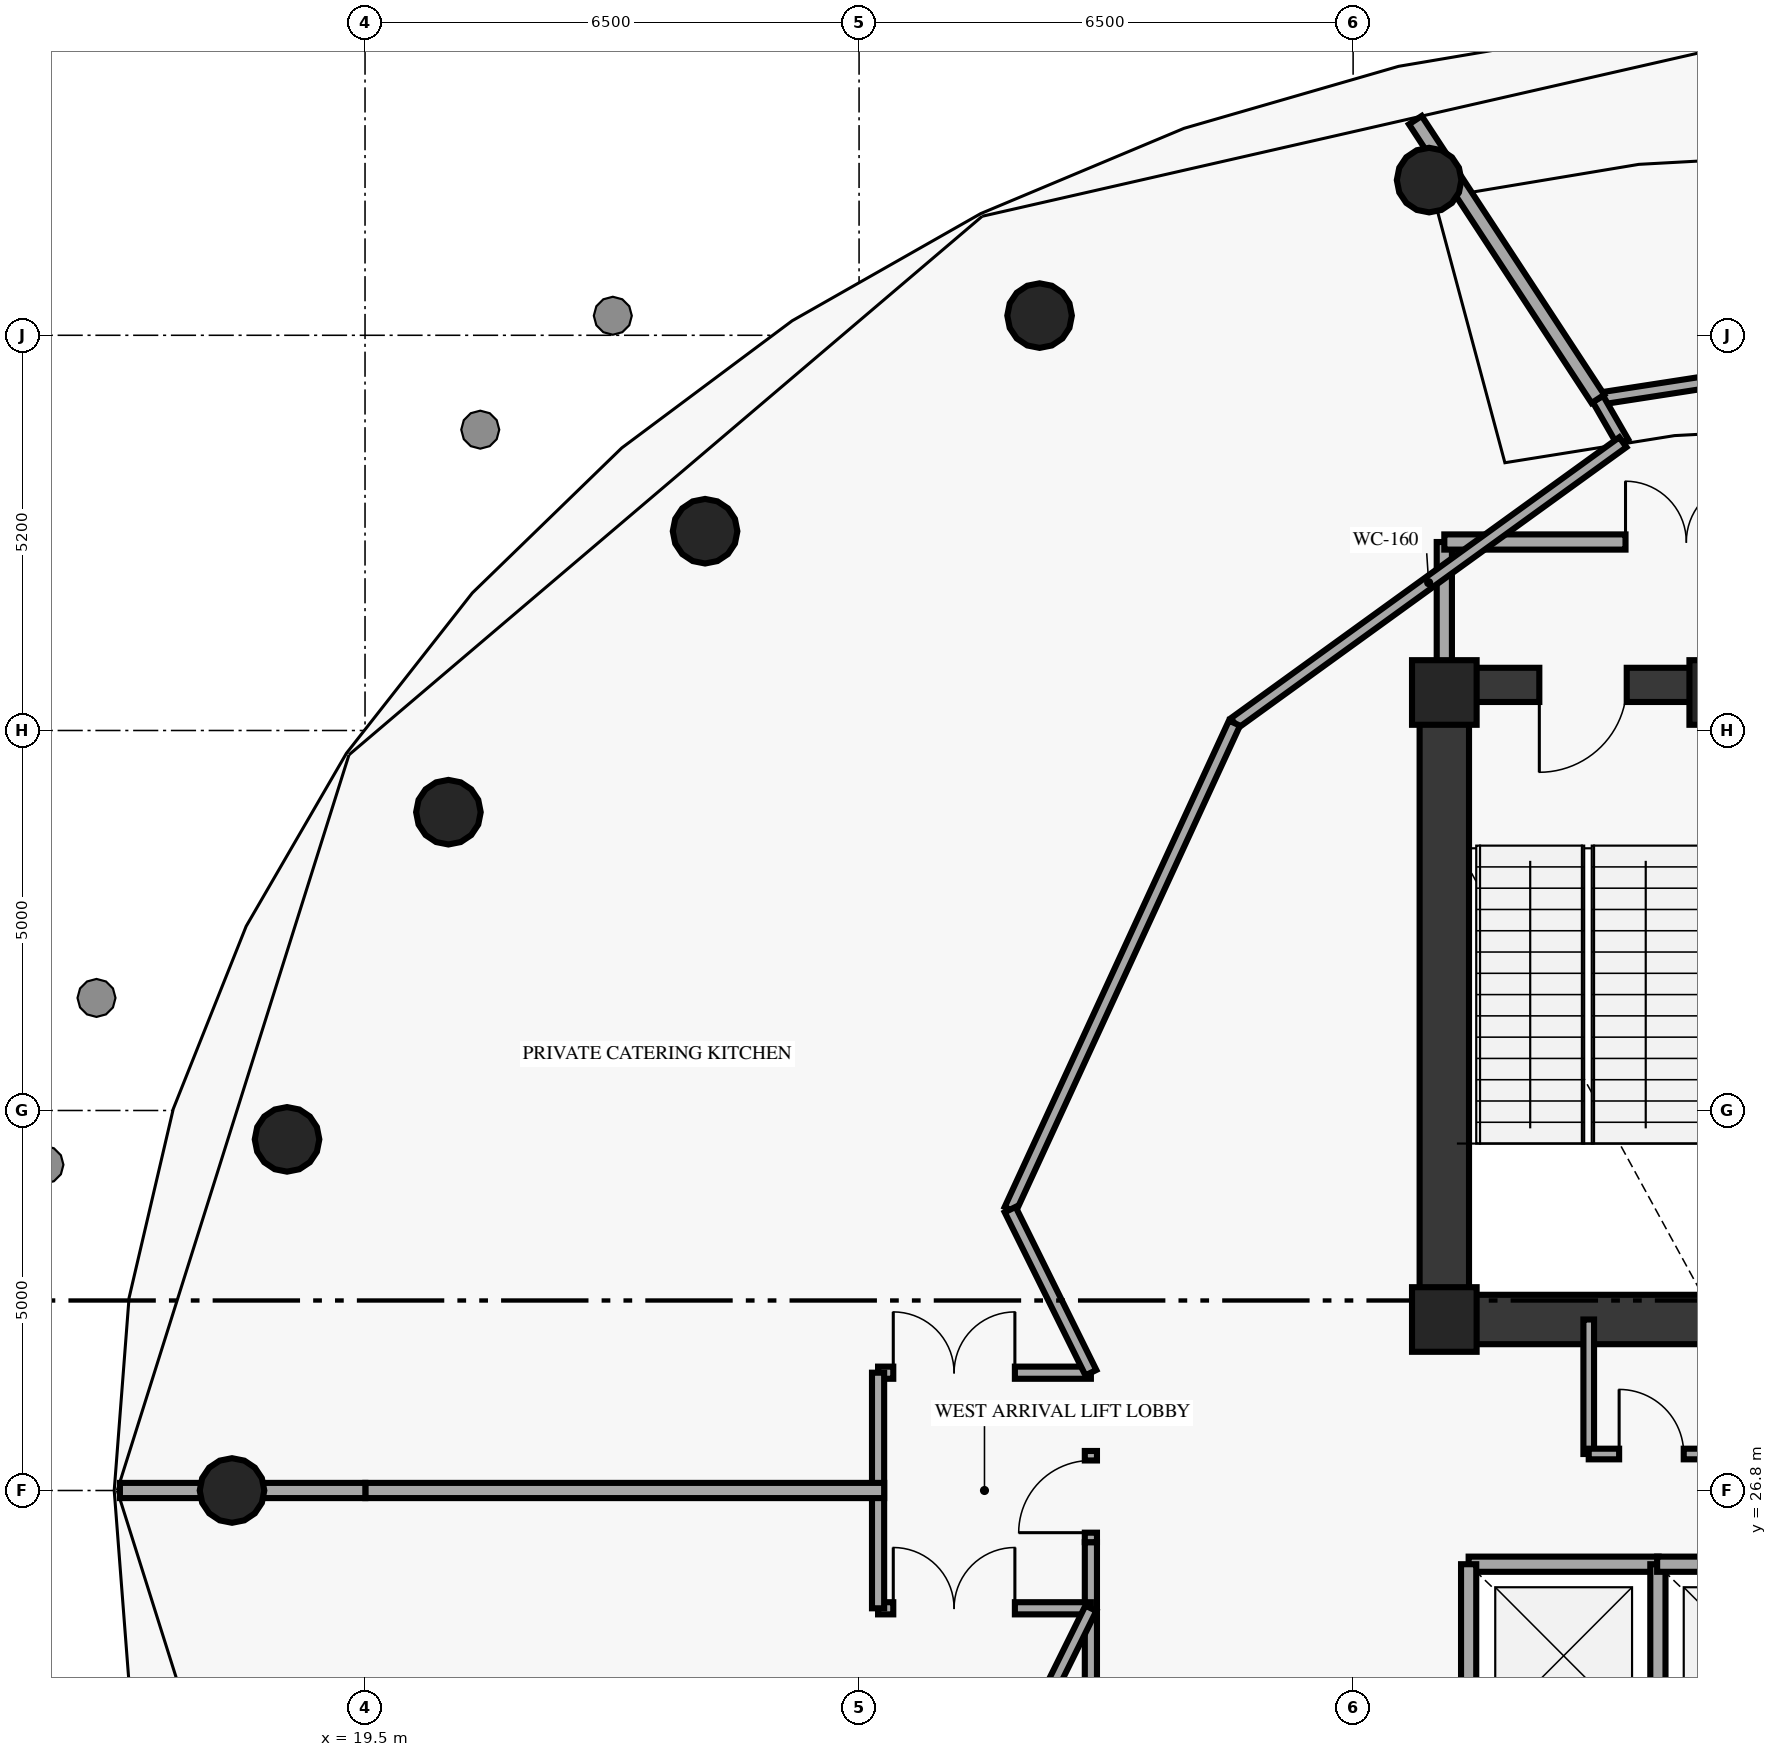
"""IFC4 building model, lengths in metres.
Left out: names, types, materials, properties, quantities, classifications, styles, units other than length and angle.
Written with IfcOpenShell. Run it as: python <this file> out.ifc"""

import sys

from ifc_helpers import new_model, si_unit, direction, frame, frame_2d, origin, origin_2d, place, context, subcontext, project, spatial, rectangle, circle, extrude, element, fill, save


model = new_model("IFC4")
c1 = context("Model", 3, precision=1e-05, world=origin(), true_north=direction((0.0, 1.0)))
c2 = subcontext(c1, "Body", "Model", "MODEL_VIEW")
j1 = project(units=[si_unit("LENGTHUNIT", "METRE"), si_unit("PLANEANGLEUNIT", "RADIAN")], contexts=[c1])
p1 = place(None, origin())
s1 = spatial("IfcSite", under=j1, at=p1, CompositionType="ELEMENT")
p2 = place(p1, origin())
s2 = spatial("IfcBuilding", under=s1, at=p2, CompositionType="ELEMENT")
p3 = place(p2, frame((0.0, 0.0, 203.15)))
s3 = spatial("IfcBuildingStorey", under=s2, at=p3, CompositionType="ELEMENT", Elevation=203.15)
for number, where, z_axis, x_axis in (
    (1, (37.35, 37.3, 0.0), (0.0, 0.0, 1.0), (1.0, 0.0, 0.0)),
    (2, (33.7, 37.3, 0.0), (0.0, 0.0, 1.0), (1.0, 0.0, 0.0)),
    (3, (33.7, 29.05, 0.0), (0.0, 0.0, 1.0), (1.0, 0.0, 0.0)),
):
    element("IfcColumn", number, at=place(p3, frame(where, z_axis=z_axis, x_axis=x_axis)), inside=s3, PredefinedType="PILASTER", context=c2, shape_type="SweptSolid", body=[
        extrude(rectangle(XDim=0.85, YDim=0.85, at=origin_2d()), origin(), (0.0, 0.0, 1.0), 4.76),
    ])
for number, where, z_axis, x_axis in (
    (4, (33.5, 44.042, 0.0), (0.0, 0.0, 1.0), (1.0, 0.0, 0.0)),
    (5, (28.375, 42.259, 0.0), (0.0, 0.0, 1.0), (1.0, 0.0, 0.0)),
    (6, (23.974, 39.422, 0.0), (0.0, 0.0, 1.0), (1.0, 0.0, 0.0)),
    (7, (20.597, 35.725, 0.0), (0.0, 0.0, 1.0), (1.0, 0.0, 0.0)),
    (8, (18.474, 31.42, 0.0), (0.0, 0.0, 1.0), (1.0, 0.0, 0.0)),
    (9, (17.75, 26.8, 0.0), (0.0, 0.0, 1.0), (1.0, 0.0, 0.0)),
):
    element("IfcColumn", number, at=place(p3, frame(where, z_axis=z_axis, x_axis=x_axis)), inside=s3, PredefinedType="COLUMN", context=c2, shape_type="SweptSolid", body=[
        extrude(circle(Radius=0.425, at=origin_2d()), origin(), (0.0, 0.0, 1.0), 4.76),
    ])
p4 = place(p3, frame((33.7, 29.05, 0.0), z_axis=(0.0, 0.0, 1.0), x_axis=(0.0, 1.0, 0.0)))
e10 = element("IfcWall", 10, at=p4, inside=s3, PredefinedType="SHEAR", context=c2, shape_type="SweptSolid", body=[
    extrude(rectangle(XDim=8.35, YDim=0.65, at=frame_2d((4.175, 0.0))), origin(), (0.0, 0.0, 1.0), 4.76),
])
p5 = place(p3, frame((33.7, 29.05, 0.0), z_axis=(0.0, 0.0, 1.0), x_axis=(1.0, 0.0, 0.0)))
e11 = element("IfcWall", 11, at=p5, inside=s3, PredefinedType="SHEAR", context=c2, shape_type="SweptSolid", body=[
    extrude(rectangle(XDim=10.6, YDim=0.65, at=frame_2d((5.3, 0.0))), origin(), (0.0, 0.0, 1.0), 4.76),
])
p6 = place(p3, frame((37.35, 37.4, 0.0), z_axis=(0.0, 0.0, 1.0), x_axis=(-1.0, 0.0, 0.0)))
e12 = element("IfcWall", 12, at=p6, inside=s3, PredefinedType="SHEAR", context=c2, shape_type="SweptSolid", body=[
    extrude(rectangle(XDim=3.65, YDim=0.45, at=frame_2d((1.825, 0.0))), origin(), (0.0, 0.0, 1.0), 4.76),
])
p7 = place(p6, frame((1.25, 0.0, 0.0)))
e13 = element("IfcOpeningElement", 13, at=p7, cuts=e12, PredefinedType="OPENING", context=c2, shape_type="SweptSolid", body=[
    extrude(rectangle(XDim=1.15, YDim=2.15, at=frame_2d((0.575, 1.075))), frame((0.0, 0.235, 0.0), z_axis=(0.0, -1.0, 0.0), x_axis=(1.0, 0.0, 0.0)), (0.0, 0.0, 1.0), 0.47),
])
p8 = place(p3, frame((33.7, 37.4, 0.0), z_axis=(0.0, 0.0, 1.0), x_axis=(0.0, 1.0, 0.0)))
e14 = element("IfcWall", 14, at=p8, inside=s3, PredefinedType="SOLIDWALL", context=c2, shape_type="SweptSolid", body=[
    extrude(rectangle(XDim=1.88, YDim=0.2, at=frame_2d((0.94, 0.0))), origin(), (0.0, 0.0, 1.0), 4.76),
])
p9 = place(p3, frame((38.9, 39.28, 0.0), z_axis=(0.0, 0.0, 1.0), x_axis=(-1.0, 0.0, 0.0)))
e15 = element("IfcWall", 15, at=p9, inside=s3, PredefinedType="SOLIDWALL", context=c2, shape_type="SweptSolid", body=[
    extrude(rectangle(XDim=5.2, YDim=0.2, at=frame_2d((2.6, 0.0))), origin(), (0.0, 0.0, 1.0), 4.76),
])
p10 = place(p9, frame((1.216, 0.0, 0.0)))
e16 = element("IfcOpeningElement", 16, at=p10, cuts=e15, PredefinedType="OPENING", context=c2, shape_type="SweptSolid", body=[
    extrude(rectangle(XDim=1.6, YDim=2.2, at=frame_2d((0.8, 1.1))), frame((0.0, 0.11, 0.0), z_axis=(0.0, -1.0, 0.0), x_axis=(1.0, 0.0, 0.0)), (0.0, 0.0, 1.0), 0.22),
])
p11 = place(p3, frame((35.6, 27.28, 0.0), z_axis=(0.0, 0.0, 1.0), x_axis=(0.0, 1.0, 0.0)))
e17 = element("IfcWall", 17, at=p11, inside=s3, PredefinedType="PARTITIONING", context=c2, shape_type="SweptSolid", body=[
    extrude(rectangle(XDim=1.77, YDim=0.14, at=frame_2d((0.885, 0.0))), origin(), (0.0, 0.0, 1.0), 4.76),
])
p12 = place(p3, frame((34.02, 25.83, 0.0), z_axis=(0.0, 0.0, 1.0), x_axis=(1.0, 0.0, 0.0)))
e18 = element("IfcWall", 18, at=p12, inside=s3, PredefinedType="SOLIDWALL", context=c2, shape_type="SweptSolid", body=[
    extrude(rectangle(XDim=2.5, YDim=0.2, at=frame_2d((1.25, 0.0))), origin(), (0.0, 0.0, 1.0), 4.76),
])
for number, where, z_axis, x_axis in (
    (19, (34.02, 23.42, 0.0), (0.0, 0.0, 1.0), (0.0, 1.0, 0.0)),
    (20, (36.51, 23.42, 0.0), (0.0, 0.0, 1.0), (0.0, 1.0, 0.0)),
):
    element("IfcWall", number, at=place(p3, frame(where, z_axis=z_axis, x_axis=x_axis)), inside=s3, PredefinedType="SOLIDWALL", context=c2, shape_type="SweptSolid", body=[
        extrude(rectangle(XDim=2.41, YDim=0.2, at=frame_2d((1.205, 0.0))), origin(), (0.0, 0.0, 1.0), 4.76),
    ])
p13 = place(p3, frame((36.5, 25.83, 0.0), z_axis=(0.0, 0.0, 1.0), x_axis=(1.0, 0.0, 0.0)))
e21 = element("IfcWall", 21, at=p13, inside=s3, PredefinedType="SOLIDWALL", context=c2, shape_type="SweptSolid", body=[
    extrude(rectangle(XDim=2.5, YDim=0.2, at=frame_2d((1.25, 0.0))), origin(), (0.0, 0.0, 1.0), 4.76),
])
p14 = place(p3, frame((29.05, 19.05, 0.0), z_axis=(0.0, 0.0, 1.0), x_axis=(0.0, 1.0, 0.0)))
e22 = element("IfcWall", 22, at=p14, inside=s3, PredefinedType="PARTITIONING", context=c2, shape_type="SweptSolid", body=[
    extrude(rectangle(XDim=7.07, YDim=0.16, at=frame_2d((3.535, 0.0))), origin(), (0.0, 0.0, 1.0), 4.76),
])
p15 = place(p3, frame((29.05, 26.12, 0.0), z_axis=(0.0, 0.0, 1.0), x_axis=(0.0, 1.0, 0.0)))
e23 = element("IfcWall", 23, at=p15, inside=s3, PredefinedType="PARTITIONING", context=c2, shape_type="SweptSolid", body=[
    extrude(rectangle(XDim=1.2, YDim=0.16, at=frame_2d((0.6, 0.0))), origin(), (0.0, 0.0, 1.0), 4.76),
])
p16 = place(p15, frame((0.125, 0.0, 0.0)))
e24 = element("IfcOpeningElement", 24, at=p16, cuts=e23, PredefinedType="OPENING", context=c2, shape_type="SweptSolid", body=[
    extrude(rectangle(XDim=0.95, YDim=2.15, at=frame_2d((0.475, 1.075))), frame((0.0, 0.09, 0.0), z_axis=(0.0, -1.0, 0.0), x_axis=(1.0, 0.0, 0.0)), (0.0, 0.0, 1.0), 0.18),
])
p17 = place(p3, frame((35.6, 27.28, 0.0), z_axis=(0.0, 0.0, 1.0), x_axis=(1.0, 0.0, 0.0)))
e25 = element("IfcWall", 25, at=p17, inside=s3, PredefinedType="PARTITIONING", context=c2, shape_type="SweptSolid", body=[
    extrude(rectangle(XDim=5.4, YDim=0.14, at=frame_2d((2.7, 0.0))), origin(), (0.0, 0.0, 1.0), 4.76),
])
p18 = place(p17, frame((0.4, 0.0, 0.0)))
e26 = element("IfcOpeningElement", 26, at=p18, cuts=e25, PredefinedType="OPENING", context=c2, shape_type="SweptSolid", body=[
    extrude(rectangle(XDim=0.85, YDim=2.1, at=frame_2d((0.425, 1.05))), frame((0.0, 0.08, 0.0), z_axis=(0.0, -1.0, 0.0), x_axis=(1.0, 0.0, 0.0)), (0.0, 0.0, 1.0), 0.16),
])
p19 = place(p17, frame((2.25, 0.0, 0.0)))
e27 = element("IfcOpeningElement", 27, at=p19, cuts=e25, PredefinedType="OPENING", context=c2, shape_type="SweptSolid", body=[
    extrude(rectangle(XDim=0.95, YDim=2.1, at=frame_2d((0.475, 1.05))), frame((0.0, 0.08, 0.0), z_axis=(0.0, -1.0, 0.0), x_axis=(1.0, 0.0, 0.0)), (0.0, 0.0, 1.0), 0.16),
])
p20 = place(p17, frame((4.2, 0.0, 0.0)))
e28 = element("IfcOpeningElement", 28, at=p20, cuts=e25, PredefinedType="OPENING", context=c2, shape_type="SweptSolid", body=[
    extrude(rectangle(XDim=0.8, YDim=2.05, at=frame_2d((0.4, 1.025))), frame((0.0, 0.08, 0.0), z_axis=(0.0, -1.0, 0.0), x_axis=(1.0, 0.0, 0.0)), (0.0, 0.0, 1.0), 0.16),
])
p21 = place(p3, frame((39.0, 41.67, 0.0), z_axis=(0.0, 0.0, 1.0), x_axis=(-0.988264270775, -0.15275382519, 0.0)))
e29 = element("IfcWall", 29, at=p21, inside=s3, PredefinedType="PARTITIONING", context=c2, shape_type="SweptSolid", body=[
    extrude(rectangle(XDim=3.318, YDim=0.16, at=frame_2d((1.659, 0.0))), origin(), (0.0, 0.0, 1.0), 4.76),
])
p22 = place(p3, frame((36.049, 40.593, 0.0), z_axis=(0.0, 0.0, 1.0), x_axis=(-0.498854625265, 0.866685677078, 0.0)))
e30 = element("IfcWall", 30, at=p22, inside=s3, PredefinedType="PARTITIONING", context=c2, shape_type="SweptSolid", body=[
    extrude(rectangle(XDim=0.658, YDim=0.16, at=frame_2d((0.329, 0.0))), origin(), (0.0, 0.0, 1.0), 4.76),
])
p23 = place(p3, frame((35.721, 41.163, 0.0), z_axis=(0.0, 0.0, 1.0), x_axis=(-0.547819348022, 0.836596654268, 0.0)))
e31 = element("IfcWall", 31, at=p23, inside=s3, PredefinedType="PARTITIONING", context=c2, shape_type="SweptSolid", body=[
    extrude(rectangle(XDim=4.384, YDim=0.2, at=frame_2d((2.192, 0.0))), origin(), (0.0, 0.0, 1.0), 4.76),
])
p24 = place(p3, frame((36.049, 40.593, 0.0), z_axis=(0.0, 0.0, 1.0), x_axis=(-0.810271736342, -0.58605436035, 0.0)))
e32 = element("IfcWall", 32, at=p24, inside=s3, PredefinedType="PARTITIONING", context=c2, shape_type="SweptSolid", body=[
    extrude(rectangle(XDim=6.307, YDim=0.16, at=frame_2d((3.153, 0.0))), origin(), (0.0, 0.0, 1.0), 4.76),
])
p25 = place(p3, frame((30.939, 36.897, 0.0), z_axis=(0.0, 0.0, 1.0), x_axis=(-0.41866934876, -0.908138742929, 0.0)))
e33 = element("IfcWall", 33, at=p25, inside=s3, PredefinedType="PARTITIONING", context=c2, shape_type="SweptSolid", body=[
    extrude(rectangle(XDim=7.048, YDim=0.16, at=frame_2d((3.524, 0.0))), origin(), (0.0, 0.0, 1.0), 4.76),
])
p26 = place(p3, frame((26.25, 28.35, 0.0), z_axis=(0.0, 0.0, 1.0), x_axis=(1.0, 0.0, 0.0)))
e34 = element("IfcWall", 34, at=p26, inside=s3, PredefinedType="PARTITIONING", context=c2, shape_type="SweptSolid", body=[
    extrude(rectangle(XDim=2.8, YDim=0.16, at=frame_2d((1.4, 0.0))), origin(), (0.0, 0.0, 1.0), 3.9),
])
p27 = place(p26, frame((0.2, 0.0, 0.0)))
e35 = element("IfcOpeningElement", 35, at=p27, cuts=e34, PredefinedType="OPENING", context=c2, shape_type="SweptSolid", body=[
    extrude(rectangle(XDim=1.6, YDim=2.2, at=frame_2d((0.8, 1.1))), frame((0.0, 0.09, 0.0), z_axis=(0.0, -1.0, 0.0), x_axis=(1.0, 0.0, 0.0)), (0.0, 0.0, 1.0), 0.18),
])
p28 = place(p3, frame((26.25, 25.25, 0.0), z_axis=(0.0, 0.0, 1.0), x_axis=(1.0, 0.0, 0.0)))
e36 = element("IfcWall", 36, at=p28, inside=s3, PredefinedType="PARTITIONING", context=c2, shape_type="SweptSolid", body=[
    extrude(rectangle(XDim=2.8, YDim=0.16, at=frame_2d((1.4, 0.0))), origin(), (0.0, 0.0, 1.0), 4.76),
])
p29 = place(p28, frame((0.2, 0.0, 0.0)))
e37 = element("IfcOpeningElement", 37, at=p29, cuts=e36, PredefinedType="OPENING", context=c2, shape_type="SweptSolid", body=[
    extrude(rectangle(XDim=1.6, YDim=2.2, at=frame_2d((0.8, 1.1))), frame((0.0, 0.09, 0.0), z_axis=(0.0, -1.0, 0.0), x_axis=(1.0, 0.0, 0.0)), (0.0, 0.0, 1.0), 0.18),
])
p30 = place(p3, frame((26.25, 25.25, 0.0), z_axis=(0.0, 0.0, 1.0), x_axis=(0.0, 1.0, 0.0)))
e38 = element("IfcWall", 38, at=p30, inside=s3, PredefinedType="PARTITIONING", context=c2, shape_type="SweptSolid", body=[
    extrude(rectangle(XDim=3.1, YDim=0.16, at=frame_2d((1.55, 0.0))), origin(), (0.0, 0.0, 1.0), 4.76),
])
for number, where, z_axis, x_axis in (
    (39, (27.988, 30.496, 0.0), (0.0, 0.0, 1.0), (0.444, -0.896, 0.0)),
    (40, (27.988, 23.104, 0.0), (0.0, 0.0, 1.0), (0.444, 0.896, 0.0)),
):
    element("IfcWall", number, at=place(p3, frame(where, z_axis=z_axis, x_axis=x_axis)), inside=s3, PredefinedType="PARTITIONING", context=c2, shape_type="SweptSolid", body=[
        extrude(rectangle(XDim=2.394, YDim=0.16, at=frame_2d((1.197, 0.0))), origin(), (0.0, 0.0, 1.0), 4.76),
    ])
p31 = place(p3, frame((26.33, 26.8, 0.0), z_axis=(0.0, 0.0, 1.0), x_axis=(-1.0, 0.0, 0.0)))
e41 = element("IfcWall", 41, at=p31, inside=s3, PredefinedType="PARTITIONING", context=c2, shape_type="SweptSolid", body=[
    extrude(rectangle(XDim=6.826, YDim=0.2, at=frame_2d((3.413, 0.0))), origin(), (0.0, 0.0, 1.0), 4.76),
])
p32 = place(p3, frame((19.504, 26.8, 0.0), z_axis=(0.0, 0.0, 1.0), x_axis=(-1.0, 0.0, 0.0)))
e42 = element("IfcWall", 42, at=p32, inside=s3, PredefinedType="PARTITIONING", context=c2, shape_type="SweptSolid", body=[
    extrude(rectangle(XDim=1.768, YDim=0.2, at=frame_2d((0.884, 0.0))), origin(), (0.0, 0.0, 1.0), 3.9),
])
p33 = place(p3, frame((17.736, 26.8, 0.0), z_axis=(0.0, 0.0, 1.0), x_axis=(-1.0, 0.0, 0.0)))
e43 = element("IfcWall", 43, at=p33, inside=s3, PredefinedType="PARTITIONING", context=c2, shape_type="SweptSolid", body=[
    extrude(rectangle(XDim=1.461, YDim=0.2, at=frame_2d((0.73, 0.0))), origin(), (0.0, 0.0, 1.0), 4.76),
])
p34 = place(p7, origin())
e44 = element("IfcDoor", 44, at=p34, inside=s3, OperationType="SINGLE_SWING_RIGHT", PredefinedType="DOOR", context=c2, shape_type="SweptSolid", body=[
    extrude(rectangle(XDim=1.15, YDim=2.15, at=frame_2d((0.575, 1.075))), frame((0.0, 0.025, 0.0), z_axis=(0.0, -1.0, 0.0), x_axis=(1.0, 0.0, 0.0)), (0.0, 0.0, 1.0), 0.05),
])
fill(e13, e44)
p35 = place(p10, origin())
e45 = element("IfcDoor", 45, at=p35, inside=s3, OperationType="DOUBLE_DOOR_SINGLE_SWING", PredefinedType="DOOR", context=c2, shape_type="SweptSolid", body=[
    extrude(rectangle(XDim=1.6, YDim=2.2, at=frame_2d((0.8, 1.1))), frame((0.0, 0.025, 0.0), z_axis=(0.0, -1.0, 0.0), x_axis=(1.0, 0.0, 0.0)), (0.0, 0.0, 1.0), 0.05),
])
fill(e16, e45)
p36 = place(p16, origin())
e46 = element("IfcDoor", 46, at=p36, inside=s3, OperationType="SINGLE_SWING_RIGHT", PredefinedType="DOOR", context=c2, shape_type="SweptSolid", body=[
    extrude(rectangle(XDim=0.95, YDim=2.15, at=frame_2d((0.475, 1.075))), frame((0.0, 0.025, 0.0), z_axis=(0.0, -1.0, 0.0), x_axis=(1.0, 0.0, 0.0)), (0.0, 0.0, 1.0), 0.05),
])
fill(e24, e46)
p37 = place(p18, origin())
e47 = element("IfcDoor", 47, at=p37, inside=s3, OperationType="SINGLE_SWING_LEFT", PredefinedType="DOOR", context=c2, shape_type="SweptSolid", body=[
    extrude(rectangle(XDim=0.85, YDim=2.1, at=frame_2d((0.425, 1.05))), frame((0.0, 0.025, 0.0), z_axis=(0.0, -1.0, 0.0), x_axis=(1.0, 0.0, 0.0)), (0.0, 0.0, 1.0), 0.05),
])
fill(e26, e47)
p38 = place(p27, origin())
e48 = element("IfcDoor", 48, at=p38, inside=s3, OperationType="DOUBLE_DOOR_SINGLE_SWING", PredefinedType="DOOR", context=c2, shape_type="SweptSolid", body=[
    extrude(rectangle(XDim=1.6, YDim=2.2, at=frame_2d((0.8, 1.1))), frame((0.0, 0.025, 0.0), z_axis=(0.0, -1.0, 0.0), x_axis=(1.0, 0.0, 0.0)), (0.0, 0.0, 1.0), 0.05),
])
fill(e35, e48)
p39 = place(p29, origin())
e49 = element("IfcDoor", 49, at=p39, inside=s3, OperationType="DOUBLE_DOOR_SINGLE_SWING", PredefinedType="DOOR", context=c2, shape_type="SweptSolid", body=[
    extrude(rectangle(XDim=1.6, YDim=2.2, at=frame_2d((0.8, 1.1))), frame((0.0, 0.025, 0.0), z_axis=(0.0, -1.0, 0.0), x_axis=(1.0, 0.0, 0.0)), (0.0, 0.0, 1.0), 0.05),
])
fill(e37, e49)
save(model, sys.argv[1])
